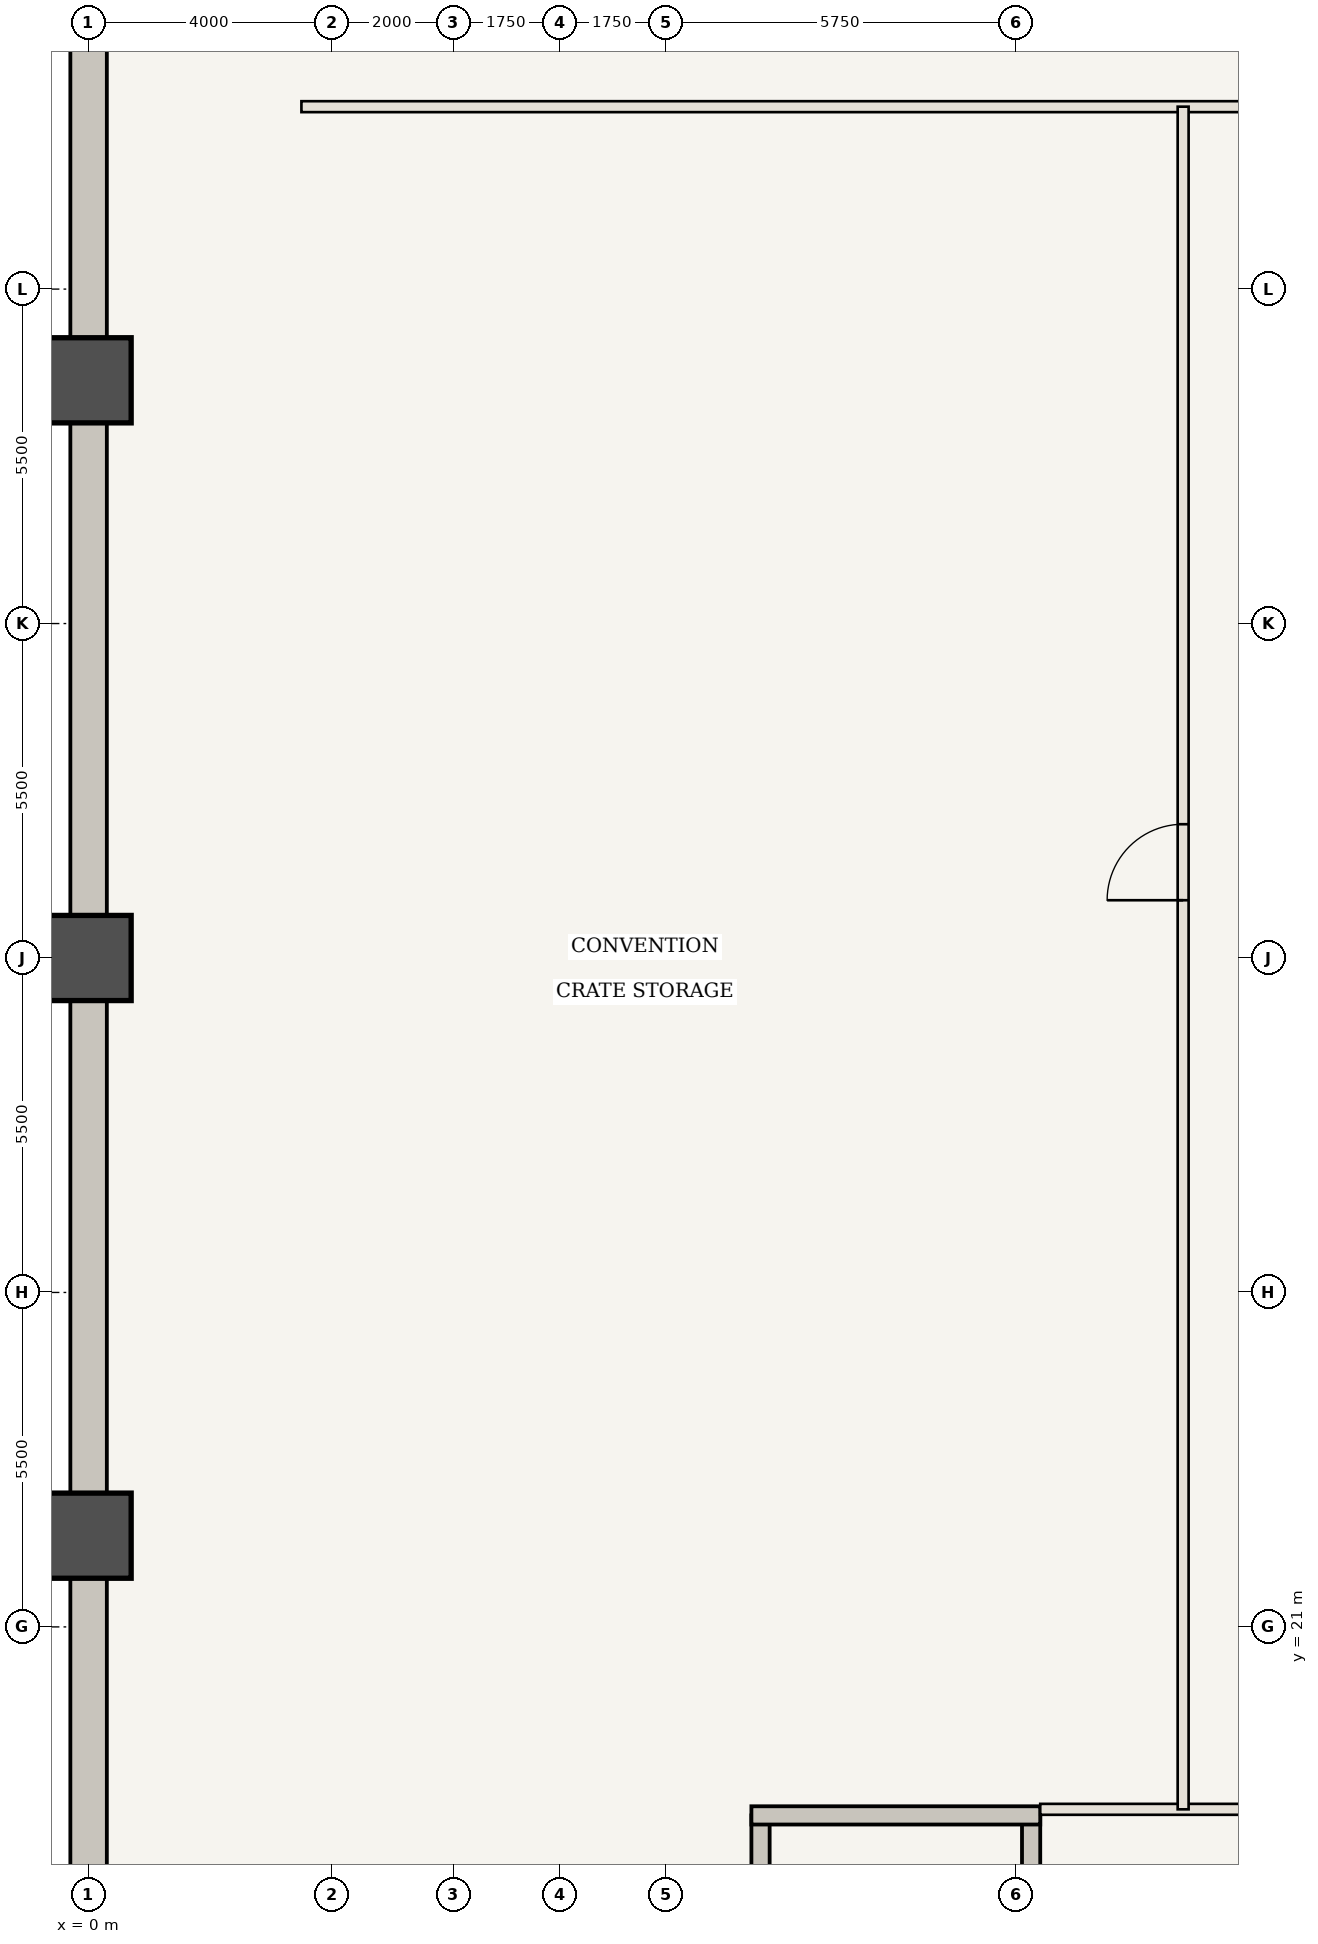
"""IFC4 building model, lengths in metres.
Left out: names, types, materials, properties, quantities, classifications, styles, units other than length and angle.
Written with IfcOpenShell. Run it as: python <this file> out.ifc"""

import sys

from ifc_helpers import new_model, si_unit, direction, frame, frame_2d, origin, origin_2d, place, context, subcontext, project, spatial, rectangle, extrude, element, fill, save


model = new_model("IFC4")
c1 = context("Model", 3, precision=1e-05, world=origin(), true_north=direction((0.0, 1.0)))
c2 = subcontext(c1, "Body", "Model", "MODEL_VIEW")
j1 = project(units=[si_unit("LENGTHUNIT", "METRE"), si_unit("PLANEANGLEUNIT", "RADIAN")], contexts=[c1])
p1 = place(None, origin())
s1 = spatial("IfcSite", under=j1, at=p1, CompositionType="ELEMENT")
p2 = place(p1, origin())
s2 = spatial("IfcBuilding", under=s1, at=p2, CompositionType="ELEMENT")
p3 = place(p2, frame((0.0, 0.0, -9.1)))
s3 = spatial("IfcBuildingStorey", under=s2, at=p3, CompositionType="ELEMENT", Elevation=-9.1)
p4 = place(p3, frame((0.0, 60.5, -0.6), z_axis=(0.0, 0.0, 1.0), x_axis=(0.0, -1.0, 0.0)))
e1 = element("IfcWall", 1, at=p4, inside=s3, PredefinedType="USERDEFINED", context=c2, shape_type="SweptSolid", body=[
    extrude(rectangle(XDim=57.0, YDim=0.6, at=frame_2d((28.5, 0.0))), origin(), (0.0, 0.0, 1.0), 5.15),
])
for number, where, z_axis, x_axis in (
    (2, (0.0, 22.5, -0.6), (0.0, 0.0, 1.0), (1.0, 0.0, 0.0)),
    (3, (0.0, 32.0, -0.6), (0.0, 0.0, 1.0), (1.0, 0.0, 0.0)),
    (4, (0.0, 41.5, -0.6), (0.0, 0.0, 1.0), (1.0, 0.0, 0.0)),
):
    element("IfcColumn", number, at=place(p3, frame(where, z_axis=z_axis, x_axis=x_axis)), inside=s3, PredefinedType="COLUMN", context=c2, shape_type="SweptSolid", body=[
        extrude(rectangle(XDim=1.4, YDim=1.4, at=origin_2d()), origin(), (0.0, 0.0, 1.0), 5.15),
    ])
p5 = place(p3, frame((11.05, 7.4, 0.0), z_axis=(0.0, 0.0, 1.0), x_axis=(0.0, 1.0, 0.0)))
e5 = element("IfcWall", 5, at=p5, inside=s3, PredefinedType="SHEAR", context=c2, shape_type="SweptSolid", body=[
    extrude(rectangle(XDim=10.5, YDim=0.3, at=frame_2d((5.25, 0.0))), origin(), (0.0, 0.0, 1.0), 4.25),
])
p6 = place(p3, frame((15.5, 7.4, 0.0), z_axis=(0.0, 0.0, 1.0), x_axis=(0.0, 1.0, 0.0)))
e6 = element("IfcWall", 6, at=p6, inside=s3, PredefinedType="SHEAR", context=c2, shape_type="SweptSolid", body=[
    extrude(rectangle(XDim=10.5, YDim=0.3, at=frame_2d((5.25, 0.0))), origin(), (0.0, 0.0, 1.0), 4.25),
])
p7 = place(p6, frame((0.58, 0.0, 0.0)))
e7 = element("IfcOpeningElement", 7, at=p7, cuts=e6, PredefinedType="OPENING", context=c2, shape_type="SweptSolid", body=[
    extrude(rectangle(XDim=1.15, YDim=2.15, at=frame_2d((0.575, 1.075))), frame((0.0, 0.16, 0.0), z_axis=(0.0, -1.0, 0.0), x_axis=(1.0, 0.0, 0.0)), (0.0, 0.0, 1.0), 0.32),
])
p8 = place(p3, frame((10.9, 17.9, 0.0), z_axis=(0.0, 0.0, 1.0), x_axis=(1.0, 0.0, 0.0)))
e8 = element("IfcWall", 8, at=p8, inside=s3, PredefinedType="SHEAR", context=c2, shape_type="SweptSolid", body=[
    extrude(rectangle(XDim=4.75, YDim=0.3, at=frame_2d((2.375, 0.0))), origin(), (0.0, 0.0, 1.0), 4.25),
])
p9 = place(p3, frame((15.65, 18.0, 0.0), z_axis=(0.0, 0.0, 1.0), x_axis=(1.0, 0.0, 0.0)))
e9 = element("IfcWall", 9, at=p9, inside=s3, PredefinedType="STANDARD", context=c2, shape_type="SweptSolid", body=[
    extrude(rectangle(XDim=22.35, YDim=0.18, at=frame_2d((11.175, 0.0))), origin(), (0.0, 0.0, 1.0), 4.25),
])
p10 = place(p9, frame((4.5, 0.0, 0.0)))
e10 = element("IfcOpeningElement", 10, at=p10, cuts=e9, PredefinedType="OPENING", context=c2, shape_type="SweptSolid", body=[
    extrude(rectangle(XDim=1.25, YDim=2.2, at=frame_2d((0.625, 1.1))), frame((0.0, 0.1, 0.0), z_axis=(0.0, -1.0, 0.0), x_axis=(1.0, 0.0, 0.0)), (0.0, 0.0, 1.0), 0.2),
])
p11 = place(p3, frame((3.5, 46.0, 0.0), z_axis=(0.0, 0.0, 1.0), x_axis=(1.0, 0.0, 0.0)))
e11 = element("IfcWall", 11, at=p11, inside=s3, PredefinedType="STANDARD", context=c2, shape_type="SweptSolid", body=[
    extrude(rectangle(XDim=22.5, YDim=0.18, at=frame_2d((11.25, 0.0))), origin(), (0.0, 0.0, 1.0), 4.25),
])
p12 = place(p11, frame((20.4, 0.0, 0.0)))
e12 = element("IfcOpeningElement", 12, at=p12, cuts=e11, PredefinedType="OPENING", context=c2, shape_type="SweptSolid", body=[
    extrude(rectangle(XDim=1.25, YDim=2.2, at=frame_2d((0.625, 1.1))), frame((0.0, 0.1, 0.0), z_axis=(0.0, -1.0, 0.0), x_axis=(1.0, 0.0, 0.0)), (0.0, 0.0, 1.0), 0.2),
])
p13 = place(p3, frame((18.0, 18.0, 0.0), z_axis=(0.0, 0.0, 1.0), x_axis=(0.0, 1.0, 0.0)))
e13 = element("IfcWall", 13, at=p13, inside=s3, PredefinedType="STANDARD", context=c2, shape_type="SweptSolid", body=[
    extrude(rectangle(XDim=28.0, YDim=0.18, at=frame_2d((14.0, 0.0))), origin(), (0.0, 0.0, 1.0), 4.25),
])
p14 = place(p13, frame((14.95, 0.0, 0.0)))
e14 = element("IfcOpeningElement", 14, at=p14, cuts=e13, PredefinedType="OPENING", context=c2, shape_type="SweptSolid", body=[
    extrude(rectangle(XDim=1.25, YDim=2.2, at=frame_2d((0.625, 1.1))), frame((0.0, 0.1, 0.0), z_axis=(0.0, -1.0, 0.0), x_axis=(1.0, 0.0, 0.0)), (0.0, 0.0, 1.0), 0.2),
])
p15 = place(p14, origin())
e15 = element("IfcDoor", 15, at=p15, inside=s3, OperationType="SINGLE_SWING_LEFT", PredefinedType="DOOR", context=c2, shape_type="SweptSolid", body=[
    extrude(rectangle(XDim=1.25, YDim=2.2, at=frame_2d((0.625, 1.1))), frame((0.0, 0.025, 0.0), z_axis=(0.0, -1.0, 0.0), x_axis=(1.0, 0.0, 0.0)), (0.0, 0.0, 1.0), 0.05),
])
fill(e14, e15)
save(model, sys.argv[1])
